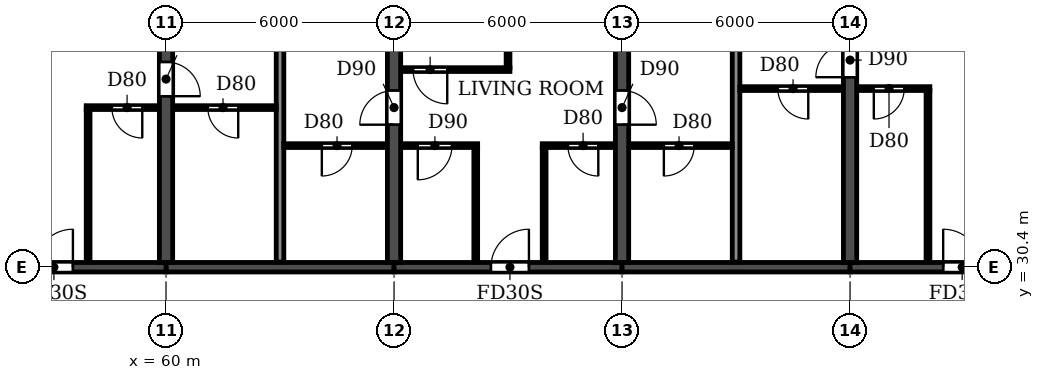
"""IFC4 building model, lengths in metres.
Left out: names, types, materials, properties, quantities, classifications, styles, units other than length and angle.
Written with IfcOpenShell. Run it as: python <this file> out.ifc"""

import sys

from ifc_helpers import new_model, si_unit, direction, frame, frame_2d, origin, place, context, subcontext, project, spatial, rectangle, extrude, element, fill, save


model = new_model("IFC4")
c1 = context("Model", 3, precision=1e-05, world=origin(), true_north=direction((0.0, 1.0)))
c2 = subcontext(c1, "Body", "Model", "MODEL_VIEW")
j1 = project(units=[si_unit("LENGTHUNIT", "METRE"), si_unit("PLANEANGLEUNIT", "RADIAN")], contexts=[c1])
p1 = place(None, origin())
s1 = spatial("IfcSite", under=j1, at=p1, CompositionType="ELEMENT")
p2 = place(p1, origin())
s2 = spatial("IfcBuilding", under=s1, at=p2, CompositionType="ELEMENT")
p3 = place(p2, frame((0.0, 0.0, 76.2)))
s3 = spatial("IfcBuildingStorey", under=s2, at=p3, CompositionType="ELEMENT", Elevation=76.2)
p4 = place(p3, frame((60.0, 30.525, 0.0), z_axis=(0.0, 0.0, 1.0), x_axis=(0.0, 1.0, 0.0)))
e1 = element("IfcWall", 1, at=p4, inside=s3, PredefinedType="SHEAR", context=c2, shape_type="SweptSolid", body=[
    extrude(rectangle(XDim=12.875, YDim=0.35, at=frame_2d((6.438, 0.0))), origin(), (0.0, 0.0, 1.0), 3.06),
])
p5 = place(p4, frame((4.375, 0.0, 0.0)))
e2 = element("IfcOpeningElement", 2, at=p5, cuts=e1, PredefinedType="OPENING", context=c2, shape_type="SweptSolid", body=[
    extrude(rectangle(XDim=0.9, YDim=2.1, at=frame_2d((0.45, 1.05))), frame((0.0, 0.185, 0.0), z_axis=(0.0, -1.0, 0.0), x_axis=(1.0, 0.0, 0.0)), (0.0, 0.0, 1.0), 0.37),
])
p6 = place(p3, frame((66.0, 30.525, 0.0), z_axis=(0.0, 0.0, 1.0), x_axis=(0.0, 1.0, 0.0)))
e3 = element("IfcWall", 3, at=p6, inside=s3, PredefinedType="SHEAR", context=c2, shape_type="SweptSolid", body=[
    extrude(rectangle(XDim=12.875, YDim=0.35, at=frame_2d((6.438, 0.0))), origin(), (0.0, 0.0, 1.0), 3.06),
])
p7 = place(p6, frame((3.625, 0.0, 0.0)))
e4 = element("IfcOpeningElement", 4, at=p7, cuts=e3, PredefinedType="OPENING", context=c2, shape_type="SweptSolid", body=[
    extrude(rectangle(XDim=0.9, YDim=2.1, at=frame_2d((0.45, 1.05))), frame((0.0, 0.185, 0.0), z_axis=(0.0, -1.0, 0.0), x_axis=(1.0, 0.0, 0.0)), (0.0, 0.0, 1.0), 0.37),
])
p8 = place(p3, frame((72.0, 30.525, 0.0), z_axis=(0.0, 0.0, 1.0), x_axis=(0.0, 1.0, 0.0)))
e5 = element("IfcWall", 5, at=p8, inside=s3, PredefinedType="SHEAR", context=c2, shape_type="SweptSolid", body=[
    extrude(rectangle(XDim=12.875, YDim=0.35, at=frame_2d((6.438, 0.0))), origin(), (0.0, 0.0, 1.0), 3.06),
])
p9 = place(p8, frame((3.625, 0.0, 0.0)))
e6 = element("IfcOpeningElement", 6, at=p9, cuts=e5, PredefinedType="OPENING", context=c2, shape_type="SweptSolid", body=[
    extrude(rectangle(XDim=0.9, YDim=2.1, at=frame_2d((0.45, 1.05))), frame((0.0, 0.185, 0.0), z_axis=(0.0, -1.0, 0.0), x_axis=(1.0, 0.0, 0.0)), (0.0, 0.0, 1.0), 0.37),
])
p10 = place(p3, frame((78.0, 30.525, 0.0), z_axis=(0.0, 0.0, 1.0), x_axis=(0.0, 1.0, 0.0)))
e7 = element("IfcWall", 7, at=p10, inside=s3, PredefinedType="SHEAR", context=c2, shape_type="SweptSolid", body=[
    extrude(rectangle(XDim=12.875, YDim=0.35, at=frame_2d((6.438, 0.0))), origin(), (0.0, 0.0, 1.0), 3.06),
])
p11 = place(p10, frame((4.875, 0.0, 0.0)))
e8 = element("IfcOpeningElement", 8, at=p11, cuts=e7, PredefinedType="OPENING", context=c2, shape_type="SweptSolid", body=[
    extrude(rectangle(XDim=0.9, YDim=2.1, at=frame_2d((0.45, 1.05))), frame((0.0, 0.185, 0.0), z_axis=(0.0, -1.0, 0.0), x_axis=(1.0, 0.0, 0.0)), (0.0, 0.0, 1.0), 0.37),
])
p12 = place(p3, frame((54.0, 30.4, 0.0), z_axis=(0.0, 0.0, 1.0), x_axis=(1.0, 0.0, 0.0)))
e9 = element("IfcWall", 9, at=p12, inside=s3, PredefinedType="SHEAR", context=c2, shape_type="SweptSolid", body=[
    extrude(rectangle(XDim=6.0, YDim=0.25, at=frame_2d((3.0, 0.0))), origin(), (0.0, 0.0, 1.0), 2.46),
])
p13 = place(p12, frame((2.55, 0.0, 0.0)))
e10 = element("IfcOpeningElement", 10, at=p13, cuts=e9, PredefinedType="OPENING", context=c2, shape_type="SweptSolid", body=[
    extrude(rectangle(XDim=1.0, YDim=2.1, at=frame_2d((0.5, 1.05))), frame((0.0, 0.135, 0.0), z_axis=(0.0, -1.0, 0.0), x_axis=(1.0, 0.0, 0.0)), (0.0, 0.0, 1.0), 0.27),
])
p14 = place(p3, frame((60.0, 30.4, 0.0), z_axis=(0.0, 0.0, 1.0), x_axis=(1.0, 0.0, 0.0)))
e11 = element("IfcWall", 11, at=p14, inside=s3, PredefinedType="SHEAR", context=c2, shape_type="SweptSolid", body=[
    extrude(rectangle(XDim=6.0, YDim=0.25, at=frame_2d((3.0, 0.0))), origin(), (0.0, 0.0, 1.0), 2.46),
])
p15 = place(p3, frame((66.0, 30.4, 0.0), z_axis=(0.0, 0.0, 1.0), x_axis=(1.0, 0.0, 0.0)))
e12 = element("IfcWall", 12, at=p15, inside=s3, PredefinedType="SHEAR", context=c2, shape_type="SweptSolid", body=[
    extrude(rectangle(XDim=6.0, YDim=0.25, at=frame_2d((3.0, 0.0))), origin(), (0.0, 0.0, 1.0), 2.46),
])
p16 = place(p15, frame((2.55, 0.0, 0.0)))
e13 = element("IfcOpeningElement", 13, at=p16, cuts=e12, PredefinedType="OPENING", context=c2, shape_type="SweptSolid", body=[
    extrude(rectangle(XDim=1.0, YDim=2.1, at=frame_2d((0.5, 1.05))), frame((0.0, 0.135, 0.0), z_axis=(0.0, -1.0, 0.0), x_axis=(1.0, 0.0, 0.0)), (0.0, 0.0, 1.0), 0.27),
])
p17 = place(p3, frame((72.0, 30.4, 0.0), z_axis=(0.0, 0.0, 1.0), x_axis=(1.0, 0.0, 0.0)))
e14 = element("IfcWall", 14, at=p17, inside=s3, PredefinedType="SHEAR", context=c2, shape_type="SweptSolid", body=[
    extrude(rectangle(XDim=6.0, YDim=0.25, at=frame_2d((3.0, 0.0))), origin(), (0.0, 0.0, 1.0), 2.46),
])
p18 = place(p3, frame((78.0, 30.4, 0.0), z_axis=(0.0, 0.0, 1.0), x_axis=(1.0, 0.0, 0.0)))
e15 = element("IfcWall", 15, at=p18, inside=s3, PredefinedType="SHEAR", context=c2, shape_type="SweptSolid", body=[
    extrude(rectangle(XDim=6.0, YDim=0.25, at=frame_2d((3.0, 0.0))), origin(), (0.0, 0.0, 1.0), 2.46),
])
p19 = place(p18, frame((2.45, 0.0, 0.0)))
e16 = element("IfcOpeningElement", 16, at=p19, cuts=e15, PredefinedType="OPENING", context=c2, shape_type="SweptSolid", body=[
    extrude(rectangle(XDim=1.0, YDim=2.1, at=frame_2d((0.5, 1.05))), frame((0.0, 0.135, 0.0), z_axis=(0.0, -1.0, 0.0), x_axis=(1.0, 0.0, 0.0)), (0.0, 0.0, 1.0), 0.27),
])
for number, where, z_axis, x_axis in (
    (17, (63.0, 30.535, 0.0), (0.0, 0.0, 1.0), (0.0, 1.0, 0.0)),
    (18, (75.0, 30.535, 0.0), (0.0, 0.0, 1.0), (0.0, 1.0, 0.0)),
):
    element("IfcWall", number, at=place(p3, frame(where, z_axis=z_axis, x_axis=x_axis)), inside=s3, PredefinedType="PARTITIONING", context=c2, shape_type="SweptSolid", body=[
        extrude(rectangle(XDim=13.005, YDim=0.2, at=frame_2d((6.502, 0.0))), origin(), (0.0, 0.0, 1.0), 3.06),
    ])
p20 = place(p3, frame((63.1, 33.6, 0.0), z_axis=(0.0, 0.0, 1.0), x_axis=(1.0, 0.0, 0.0)))
e19 = element("IfcWall", 19, at=p20, inside=s3, PredefinedType="PARTITIONING", context=c2, shape_type="SweptSolid", body=[
    extrude(rectangle(XDim=2.715, YDim=0.1, at=frame_2d((1.357, 0.0))), origin(), (0.0, 0.0, 1.0), 3.06),
])
p21 = place(p20, frame((1.0, 0.0, 0.0)))
e20 = element("IfcOpeningElement", 20, at=p21, cuts=e19, PredefinedType="OPENING", context=c2, shape_type="SweptSolid", body=[
    extrude(rectangle(XDim=0.8, YDim=2.1, at=frame_2d((0.4, 1.05))), frame((0.0, 0.06, 0.0), z_axis=(0.0, -1.0, 0.0), x_axis=(1.0, 0.0, 0.0)), (0.0, 0.0, 1.0), 0.12),
])
p22 = place(p3, frame((66.185, 33.6, 0.0), z_axis=(0.0, 0.0, 1.0), x_axis=(1.0, 0.0, 0.0)))
e21 = element("IfcWall", 21, at=p22, inside=s3, PredefinedType="PARTITIONING", context=c2, shape_type="SweptSolid", body=[
    extrude(rectangle(XDim=2.015, YDim=0.1, at=frame_2d((1.007, 0.0))), origin(), (0.0, 0.0, 1.0), 3.06),
])
p23 = place(p22, frame((0.44, 0.0, 0.0)))
e22 = element("IfcOpeningElement", 22, at=p23, cuts=e21, PredefinedType="OPENING", context=c2, shape_type="SweptSolid", body=[
    extrude(rectangle(XDim=0.9, YDim=2.1, at=frame_2d((0.45, 1.05))), frame((0.0, 0.06, 0.0), z_axis=(0.0, -1.0, 0.0), x_axis=(1.0, 0.0, 0.0)), (0.0, 0.0, 1.0), 0.12),
])
p24 = place(p3, frame((69.9, 33.6, 0.0), z_axis=(0.0, 0.0, 1.0), x_axis=(1.0, 0.0, 0.0)))
e23 = element("IfcWall", 23, at=p24, inside=s3, PredefinedType="PARTITIONING", context=c2, shape_type="SweptSolid", body=[
    extrude(rectangle(XDim=1.915, YDim=0.1, at=frame_2d((0.958, 0.0))), origin(), (0.0, 0.0, 1.0), 3.06),
])
p25 = place(p24, frame((0.675, 0.0, 0.0)))
e24 = element("IfcOpeningElement", 24, at=p25, cuts=e23, PredefinedType="OPENING", context=c2, shape_type="SweptSolid", body=[
    extrude(rectangle(XDim=0.8, YDim=2.1, at=frame_2d((0.4, 1.05))), frame((0.0, 0.06, 0.0), z_axis=(0.0, -1.0, 0.0), x_axis=(1.0, 0.0, 0.0)), (0.0, 0.0, 1.0), 0.12),
])
p26 = place(p3, frame((72.185, 33.6, 0.0), z_axis=(0.0, 0.0, 1.0), x_axis=(1.0, 0.0, 0.0)))
e25 = element("IfcWall", 25, at=p26, inside=s3, PredefinedType="PARTITIONING", context=c2, shape_type="SweptSolid", body=[
    extrude(rectangle(XDim=2.715, YDim=0.1, at=frame_2d((1.357, 0.0))), origin(), (0.0, 0.0, 1.0), 3.06),
])
p27 = place(p26, frame((0.915, 0.0, 0.0)))
e26 = element("IfcOpeningElement", 26, at=p27, cuts=e25, PredefinedType="OPENING", context=c2, shape_type="SweptSolid", body=[
    extrude(rectangle(XDim=0.8, YDim=2.1, at=frame_2d((0.4, 1.05))), frame((0.0, 0.06, 0.0), z_axis=(0.0, -1.0, 0.0), x_axis=(1.0, 0.0, 0.0)), (0.0, 0.0, 1.0), 0.12),
])
p28 = place(p3, frame((57.9, 34.6, 0.0), z_axis=(0.0, 0.0, 1.0), x_axis=(1.0, 0.0, 0.0)))
e27 = element("IfcWall", 27, at=p28, inside=s3, PredefinedType="PARTITIONING", context=c2, shape_type="SweptSolid", body=[
    extrude(rectangle(XDim=1.915, YDim=0.1, at=frame_2d((0.958, 0.0))), origin(), (0.0, 0.0, 1.0), 3.06),
])
p29 = place(p28, frame((0.675, 0.0, 0.0)))
e28 = element("IfcOpeningElement", 28, at=p29, cuts=e27, PredefinedType="OPENING", context=c2, shape_type="SweptSolid", body=[
    extrude(rectangle(XDim=0.8, YDim=2.1, at=frame_2d((0.4, 1.05))), frame((0.0, 0.06, 0.0), z_axis=(0.0, -1.0, 0.0), x_axis=(1.0, 0.0, 0.0)), (0.0, 0.0, 1.0), 0.12),
])
p30 = place(p3, frame((60.185, 34.6, 0.0), z_axis=(0.0, 0.0, 1.0), x_axis=(1.0, 0.0, 0.0)))
e29 = element("IfcWall", 29, at=p30, inside=s3, PredefinedType="PARTITIONING", context=c2, shape_type="SweptSolid", body=[
    extrude(rectangle(XDim=2.715, YDim=0.1, at=frame_2d((1.357, 0.0))), origin(), (0.0, 0.0, 1.0), 3.06),
])
p31 = place(p30, frame((0.915, 0.0, 0.0)))
e30 = element("IfcOpeningElement", 30, at=p31, cuts=e29, PredefinedType="OPENING", context=c2, shape_type="SweptSolid", body=[
    extrude(rectangle(XDim=0.8, YDim=2.1, at=frame_2d((0.4, 1.05))), frame((0.0, 0.06, 0.0), z_axis=(0.0, -1.0, 0.0), x_axis=(1.0, 0.0, 0.0)), (0.0, 0.0, 1.0), 0.12),
])
p32 = place(p3, frame((75.1, 35.1, 0.0), z_axis=(0.0, 0.0, 1.0), x_axis=(1.0, 0.0, 0.0)))
e31 = element("IfcWall", 31, at=p32, inside=s3, PredefinedType="PARTITIONING", context=c2, shape_type="SweptSolid", body=[
    extrude(rectangle(XDim=2.715, YDim=0.1, at=frame_2d((1.357, 0.0))), origin(), (0.0, 0.0, 1.0), 3.06),
])
p33 = place(p32, frame((1.0, 0.0, 0.0)))
e32 = element("IfcOpeningElement", 32, at=p33, cuts=e31, PredefinedType="OPENING", context=c2, shape_type="SweptSolid", body=[
    extrude(rectangle(XDim=0.8, YDim=2.1, at=frame_2d((0.4, 1.05))), frame((0.0, 0.06, 0.0), z_axis=(0.0, -1.0, 0.0), x_axis=(1.0, 0.0, 0.0)), (0.0, 0.0, 1.0), 0.12),
])
p34 = place(p3, frame((78.185, 35.1, 0.0), z_axis=(0.0, 0.0, 1.0), x_axis=(1.0, 0.0, 0.0)))
e33 = element("IfcWall", 33, at=p34, inside=s3, PredefinedType="PARTITIONING", context=c2, shape_type="SweptSolid", body=[
    extrude(rectangle(XDim=1.915, YDim=0.1, at=frame_2d((0.958, 0.0))), origin(), (0.0, 0.0, 1.0), 3.06),
])
p35 = place(p34, frame((0.44, 0.0, 0.0)))
e34 = element("IfcOpeningElement", 34, at=p35, cuts=e33, PredefinedType="OPENING", context=c2, shape_type="SweptSolid", body=[
    extrude(rectangle(XDim=0.8, YDim=2.1, at=frame_2d((0.4, 1.05))), frame((0.0, 0.06, 0.0), z_axis=(0.0, -1.0, 0.0), x_axis=(1.0, 0.0, 0.0)), (0.0, 0.0, 1.0), 0.12),
])
p36 = place(p3, frame((66.185, 35.6, 0.0), z_axis=(0.0, 0.0, 1.0), x_axis=(1.0, 0.0, 0.0)))
e35 = element("IfcWall", 35, at=p36, inside=s3, PredefinedType="PARTITIONING", context=c2, shape_type="SweptSolid", body=[
    extrude(rectangle(XDim=2.865, YDim=0.1, at=frame_2d((1.433, 0.0))), origin(), (0.0, 0.0, 1.0), 3.06),
])
p37 = place(p36, frame((0.315, 0.0, 0.0)))
e36 = element("IfcOpeningElement", 36, at=p37, cuts=e35, PredefinedType="OPENING", context=c2, shape_type="SweptSolid", body=[
    extrude(rectangle(XDim=0.9, YDim=2.1, at=frame_2d((0.45, 1.05))), frame((0.0, 0.06, 0.0), z_axis=(0.0, -1.0, 0.0), x_axis=(1.0, 0.0, 0.0)), (0.0, 0.0, 1.0), 0.12),
])
p38 = place(p3, frame((57.95, 30.535, 0.0), z_axis=(0.0, 0.0, 1.0), x_axis=(0.0, 1.0, 0.0)))
e37 = element("IfcWall", 37, at=p38, inside=s3, PredefinedType="PARTITIONING", context=c2, shape_type="SweptSolid", body=[
    extrude(rectangle(XDim=4.015, YDim=0.1, at=frame_2d((2.008, 0.0))), origin(), (0.0, 0.0, 1.0), 3.06),
])
p39 = place(p3, frame((68.15, 30.535, 0.0), z_axis=(0.0, 0.0, 1.0), x_axis=(0.0, 1.0, 0.0)))
e38 = element("IfcWall", 38, at=p39, inside=s3, PredefinedType="PARTITIONING", context=c2, shape_type="SweptSolid", body=[
    extrude(rectangle(XDim=3.015, YDim=0.1, at=frame_2d((1.508, 0.0))), origin(), (0.0, 0.0, 1.0), 3.06),
])
p40 = place(p3, frame((69.0, 35.65, 0.0), z_axis=(0.0, 0.0, 1.0), x_axis=(0.0, 1.0, 0.0)))
e39 = element("IfcWall", 39, at=p40, inside=s3, PredefinedType="PARTITIONING", context=c2, shape_type="SweptSolid", body=[
    extrude(rectangle(XDim=7.89, YDim=0.1, at=frame_2d((3.945, 0.0))), origin(), (0.0, 0.0, 1.0), 3.06),
])
p41 = place(p3, frame((69.95, 30.535, 0.0), z_axis=(0.0, 0.0, 1.0), x_axis=(0.0, 1.0, 0.0)))
e40 = element("IfcWall", 40, at=p41, inside=s3, PredefinedType="PARTITIONING", context=c2, shape_type="SweptSolid", body=[
    extrude(rectangle(XDim=3.015, YDim=0.1, at=frame_2d((1.508, 0.0))), origin(), (0.0, 0.0, 1.0), 3.06),
])
p42 = place(p3, frame((80.05, 30.535, 0.0), z_axis=(0.0, 0.0, 1.0), x_axis=(0.0, 1.0, 0.0)))
e41 = element("IfcWall", 41, at=p42, inside=s3, PredefinedType="PARTITIONING", context=c2, shape_type="SweptSolid", body=[
    extrude(rectangle(XDim=4.515, YDim=0.1, at=frame_2d((2.258, 0.0))), origin(), (0.0, 0.0, 1.0), 3.06),
])
p43 = place(p31, frame((0.8, 0.0, 0.0), z_axis=(0.0, 0.0, 1.0), x_axis=(-1.0, 0.0, 0.0)))
e42 = element("IfcDoor", 42, at=p43, inside=s3, OperationType="SINGLE_SWING_LEFT", PredefinedType="DOOR", context=c2, shape_type="SweptSolid", body=[
    extrude(rectangle(XDim=0.8, YDim=2.1, at=frame_2d((0.4, 1.05))), frame((0.0, 0.025, 0.0), z_axis=(0.0, -1.0, 0.0), x_axis=(1.0, 0.0, 0.0)), (0.0, 0.0, 1.0), 0.05),
])
fill(e30, e42)
p44 = place(p13, origin())
e43 = element("IfcDoor", 43, at=p44, inside=s3, OperationType="SINGLE_SWING_RIGHT", PredefinedType="DOOR", context=c2, shape_type="SweptSolid", body=[
    extrude(rectangle(XDim=1.0, YDim=2.1, at=frame_2d((0.5, 1.05))), frame((0.0, 0.025, 0.0), z_axis=(0.0, -1.0, 0.0), x_axis=(1.0, 0.0, 0.0)), (0.0, 0.0, 1.0), 0.05),
])
fill(e10, e43)
p45 = place(p29, frame((0.8, 0.0, 0.0), z_axis=(0.0, 0.0, 1.0), x_axis=(-1.0, 0.0, 0.0)))
e44 = element("IfcDoor", 44, at=p45, inside=s3, OperationType="SINGLE_SWING_LEFT", PredefinedType="DOOR", context=c2, shape_type="SweptSolid", body=[
    extrude(rectangle(XDim=0.8, YDim=2.1, at=frame_2d((0.4, 1.05))), frame((0.0, 0.025, 0.0), z_axis=(0.0, -1.0, 0.0), x_axis=(1.0, 0.0, 0.0)), (0.0, 0.0, 1.0), 0.05),
])
fill(e28, e44)
p46 = place(p5, frame((0.9, 0.0, 0.0), z_axis=(0.0, 0.0, 1.0), x_axis=(-1.0, 0.0, 0.0)))
e45 = element("IfcDoor", 45, at=p46, inside=s3, OperationType="SINGLE_SWING_RIGHT", PredefinedType="DOOR", context=c2, shape_type="SweptSolid", body=[
    extrude(rectangle(XDim=0.9, YDim=2.1, at=frame_2d((0.45, 1.05))), frame((0.0, 0.025, 0.0), z_axis=(0.0, -1.0, 0.0), x_axis=(1.0, 0.0, 0.0)), (0.0, 0.0, 1.0), 0.05),
])
fill(e2, e45)
p47 = place(p21, frame((0.8, 0.0, 0.0), z_axis=(0.0, 0.0, 1.0), x_axis=(-1.0, 0.0, 0.0)))
e46 = element("IfcDoor", 46, at=p47, inside=s3, OperationType="SINGLE_SWING_RIGHT", PredefinedType="DOOR", context=c2, shape_type="SweptSolid", body=[
    extrude(rectangle(XDim=0.8, YDim=2.1, at=frame_2d((0.4, 1.05))), frame((0.0, 0.025, 0.0), z_axis=(0.0, -1.0, 0.0), x_axis=(1.0, 0.0, 0.0)), (0.0, 0.0, 1.0), 0.05),
])
fill(e20, e46)
p48 = place(p27, frame((0.8, 0.0, 0.0), z_axis=(0.0, 0.0, 1.0), x_axis=(-1.0, 0.0, 0.0)))
e47 = element("IfcDoor", 47, at=p48, inside=s3, OperationType="SINGLE_SWING_RIGHT", PredefinedType="DOOR", context=c2, shape_type="SweptSolid", body=[
    extrude(rectangle(XDim=0.8, YDim=2.1, at=frame_2d((0.4, 1.05))), frame((0.0, 0.025, 0.0), z_axis=(0.0, -1.0, 0.0), x_axis=(1.0, 0.0, 0.0)), (0.0, 0.0, 1.0), 0.05),
])
fill(e26, e47)
p49 = place(p7, origin())
e48 = element("IfcDoor", 48, at=p49, inside=s3, OperationType="SINGLE_SWING_LEFT", PredefinedType="DOOR", context=c2, shape_type="SweptSolid", body=[
    extrude(rectangle(XDim=0.9, YDim=2.1, at=frame_2d((0.45, 1.05))), frame((0.0, 0.025, 0.0), z_axis=(0.0, -1.0, 0.0), x_axis=(1.0, 0.0, 0.0)), (0.0, 0.0, 1.0), 0.05),
])
fill(e4, e48)
p50 = place(p37, frame((0.9, 0.0, 0.0), z_axis=(0.0, 0.0, 1.0), x_axis=(-1.0, 0.0, 0.0)))
e49 = element("IfcDoor", 49, at=p50, inside=s3, OperationType="SINGLE_SWING_LEFT", PredefinedType="DOOR", context=c2, shape_type="SweptSolid", body=[
    extrude(rectangle(XDim=0.9, YDim=2.1, at=frame_2d((0.45, 1.05))), frame((0.0, 0.025, 0.0), z_axis=(0.0, -1.0, 0.0), x_axis=(1.0, 0.0, 0.0)), (0.0, 0.0, 1.0), 0.05),
])
fill(e36, e49)
p51 = place(p23, frame((0.9, 0.0, 0.0), z_axis=(0.0, 0.0, 1.0), x_axis=(-1.0, 0.0, 0.0)))
e50 = element("IfcDoor", 50, at=p51, inside=s3, OperationType="SINGLE_SWING_RIGHT", PredefinedType="DOOR", context=c2, shape_type="SweptSolid", body=[
    extrude(rectangle(XDim=0.9, YDim=2.1, at=frame_2d((0.45, 1.05))), frame((0.0, 0.025, 0.0), z_axis=(0.0, -1.0, 0.0), x_axis=(1.0, 0.0, 0.0)), (0.0, 0.0, 1.0), 0.05),
])
fill(e22, e50)
p52 = place(p16, origin())
e51 = element("IfcDoor", 51, at=p52, inside=s3, OperationType="SINGLE_SWING_RIGHT", PredefinedType="DOOR", context=c2, shape_type="SweptSolid", body=[
    extrude(rectangle(XDim=1.0, YDim=2.1, at=frame_2d((0.5, 1.05))), frame((0.0, 0.025, 0.0), z_axis=(0.0, -1.0, 0.0), x_axis=(1.0, 0.0, 0.0)), (0.0, 0.0, 1.0), 0.05),
])
fill(e13, e51)
p53 = place(p25, frame((0.8, 0.0, 0.0), z_axis=(0.0, 0.0, 1.0), x_axis=(-1.0, 0.0, 0.0)))
e52 = element("IfcDoor", 52, at=p53, inside=s3, OperationType="SINGLE_SWING_LEFT", PredefinedType="DOOR", context=c2, shape_type="SweptSolid", body=[
    extrude(rectangle(XDim=0.8, YDim=2.1, at=frame_2d((0.4, 1.05))), frame((0.0, 0.025, 0.0), z_axis=(0.0, -1.0, 0.0), x_axis=(1.0, 0.0, 0.0)), (0.0, 0.0, 1.0), 0.05),
])
fill(e24, e52)
p54 = place(p9, frame((0.9, 0.0, 0.0), z_axis=(0.0, 0.0, 1.0), x_axis=(-1.0, 0.0, 0.0)))
e53 = element("IfcDoor", 53, at=p54, inside=s3, OperationType="SINGLE_SWING_RIGHT", PredefinedType="DOOR", context=c2, shape_type="SweptSolid", body=[
    extrude(rectangle(XDim=0.9, YDim=2.1, at=frame_2d((0.45, 1.05))), frame((0.0, 0.025, 0.0), z_axis=(0.0, -1.0, 0.0), x_axis=(1.0, 0.0, 0.0)), (0.0, 0.0, 1.0), 0.05),
])
fill(e6, e53)
p55 = place(p33, frame((0.8, 0.0, 0.0), z_axis=(0.0, 0.0, 1.0), x_axis=(-1.0, 0.0, 0.0)))
e54 = element("IfcDoor", 54, at=p55, inside=s3, OperationType="SINGLE_SWING_LEFT", PredefinedType="DOOR", context=c2, shape_type="SweptSolid", body=[
    extrude(rectangle(XDim=0.8, YDim=2.1, at=frame_2d((0.4, 1.05))), frame((0.0, 0.025, 0.0), z_axis=(0.0, -1.0, 0.0), x_axis=(1.0, 0.0, 0.0)), (0.0, 0.0, 1.0), 0.05),
])
fill(e32, e54)
p56 = place(p11, origin())
e55 = element("IfcDoor", 55, at=p56, inside=s3, OperationType="SINGLE_SWING_LEFT", PredefinedType="DOOR", context=c2, shape_type="SweptSolid", body=[
    extrude(rectangle(XDim=0.9, YDim=2.1, at=frame_2d((0.45, 1.05))), frame((0.0, 0.025, 0.0), z_axis=(0.0, -1.0, 0.0), x_axis=(1.0, 0.0, 0.0)), (0.0, 0.0, 1.0), 0.05),
])
fill(e8, e55)
p57 = place(p35, frame((0.8, 0.0, 0.0), z_axis=(0.0, 0.0, 1.0), x_axis=(-1.0, 0.0, 0.0)))
e56 = element("IfcDoor", 56, at=p57, inside=s3, OperationType="SINGLE_SWING_RIGHT", PredefinedType="DOOR", context=c2, shape_type="SweptSolid", body=[
    extrude(rectangle(XDim=0.8, YDim=2.1, at=frame_2d((0.4, 1.05))), frame((0.0, 0.025, 0.0), z_axis=(0.0, -1.0, 0.0), x_axis=(1.0, 0.0, 0.0)), (0.0, 0.0, 1.0), 0.05),
])
fill(e34, e56)
p58 = place(p19, origin())
e57 = element("IfcDoor", 57, at=p58, inside=s3, OperationType="SINGLE_SWING_LEFT", PredefinedType="DOOR", context=c2, shape_type="SweptSolid", body=[
    extrude(rectangle(XDim=1.0, YDim=2.1, at=frame_2d((0.5, 1.05))), frame((0.0, 0.025, 0.0), z_axis=(0.0, -1.0, 0.0), x_axis=(1.0, 0.0, 0.0)), (0.0, 0.0, 1.0), 0.05),
])
fill(e16, e57)
save(model, sys.argv[1])
